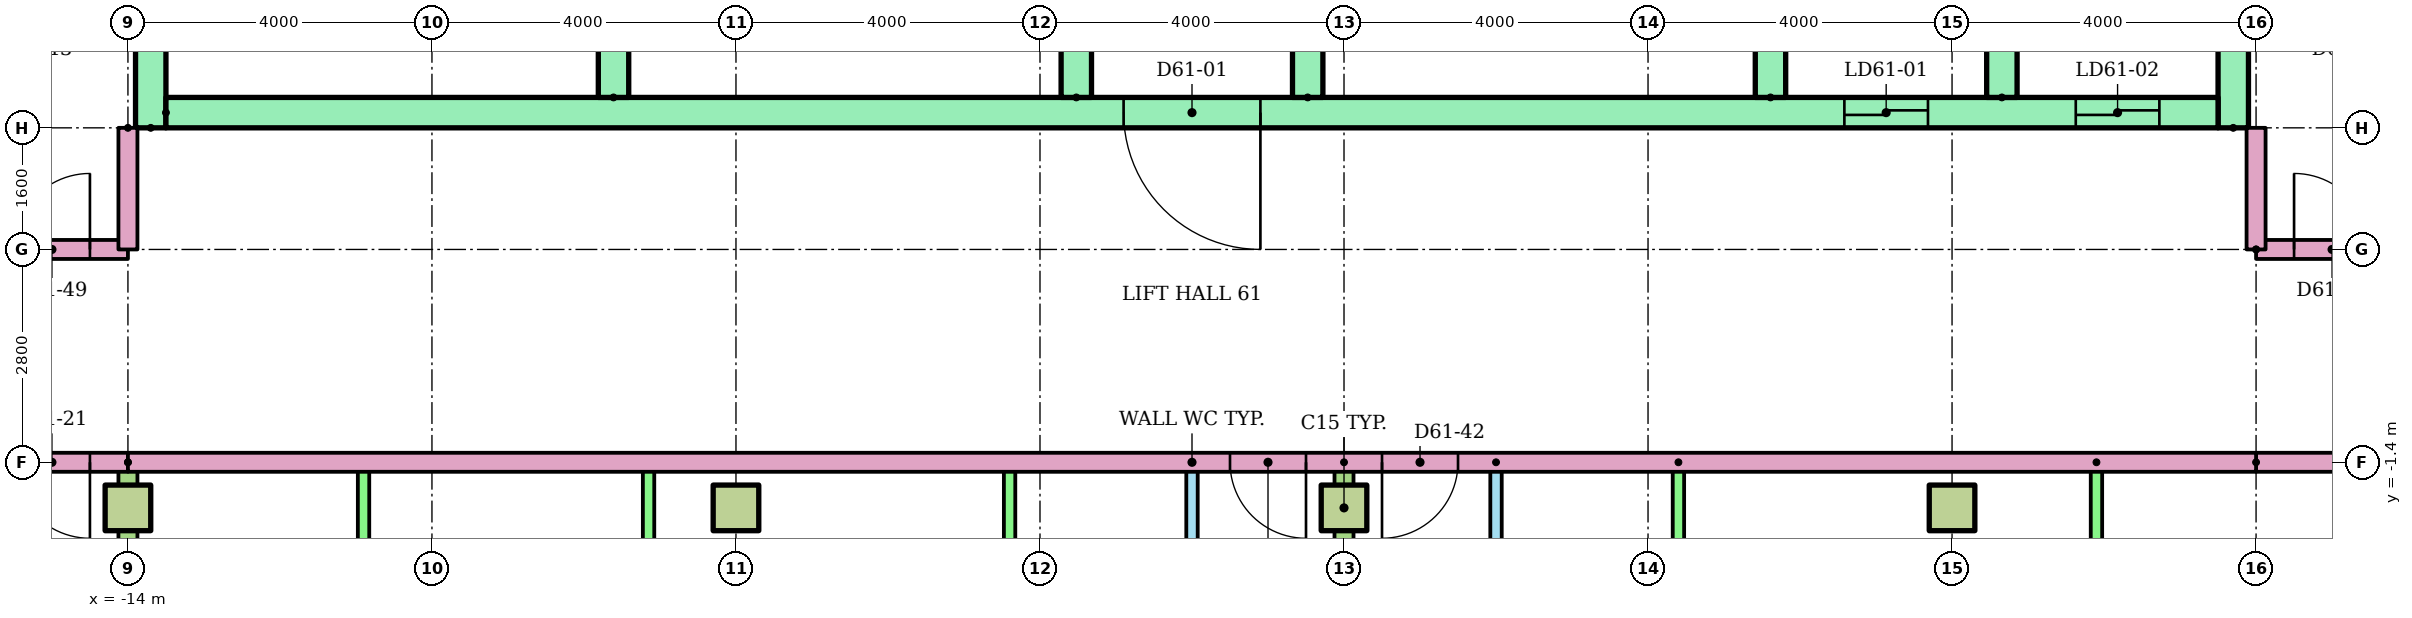
"""IFC4 building model, lengths in metres.
Left out: names, types, materials, properties, quantities, classifications, styles, units other than length and angle.
Written with IfcOpenShell. Run it as: python <this file> out.ifc"""

import sys

from ifc_helpers import new_model, si_unit, direction, frame, frame_2d, origin, origin_2d, place, context, subcontext, project, spatial, rectangle, extrude, element, fill, save


model = new_model("IFC4")
c1 = context("Model", 3, precision=1e-05, world=origin(), true_north=direction((0.0, 1.0)))
c2 = subcontext(c1, "Body", "Model", "MODEL_VIEW")
j1 = project(units=[si_unit("LENGTHUNIT", "METRE"), si_unit("PLANEANGLEUNIT", "RADIAN")], contexts=[c1])
p1 = place(None, origin())
s1 = spatial("IfcSite", under=j1, at=p1, CompositionType="ELEMENT")
p2 = place(p1, origin())
s2 = spatial("IfcBuilding", under=s1, at=p2, CompositionType="ELEMENT")
p3 = place(p2, frame((0.0, 0.0, 233.2)))
s3 = spatial("IfcBuildingStorey", under=s2, at=p3, CompositionType="ELEMENT", Elevation=233.2)
for number, where in (
    (1, (-14.0, -2.0, 0.0)),
    (2, (-6.0, -2.0, 0.0)),
    (3, (2.0, -2.0, 0.0)),
    (4, (10.0, -2.0, 0.0)),
):
    element("IfcColumn", number, at=place(p3, frame(where)), inside=s3, PredefinedType="COLUMN", context=c2, shape_type="SweptSolid", body=[
        extrude(rectangle(XDim=0.6, YDim=0.6, at=origin_2d()), origin(), (0.0, 0.0, 1.0), 3.2),
    ])
for number, where, z_axis, x_axis in (
    (5, (-13.7, 3.0, 0.0), (0.0, 0.0, 1.0), (0.0, 1.0, 0.0)),
    (6, (13.7, 3.0, 0.0), (0.0, 0.0, 1.0), (0.0, 1.0, 0.0)),
):
    element("IfcWall", number, at=place(p3, frame(where, z_axis=z_axis, x_axis=x_axis)), inside=s3, PredefinedType="SHEAR", context=c2, shape_type="SweptSolid", body=[
        extrude(rectangle(XDim=17.0, YDim=0.4, at=frame_2d((8.5, 0.0))), origin(), (0.0, 0.0, 1.0), 2.92),
    ])
p4 = place(p3, frame((-13.5, 3.2, 0.0)))
e7 = element("IfcWall", 7, at=p4, inside=s3, PredefinedType="SHEAR", context=c2, shape_type="SweptSolid", body=[
    extrude(rectangle(XDim=27.0, YDim=0.4, at=frame_2d((13.5, 0.0))), origin(), (0.0, 0.0, 1.0), 2.92),
])
p5 = place(p4, frame((22.083, 0.0, 0.0)))
e8 = element("IfcOpeningElement", 8, at=p5, cuts=e7, PredefinedType="OPENING", context=c2, shape_type="SweptSolid", body=[
    extrude(rectangle(XDim=1.1, YDim=2.1, at=frame_2d((0.55, 1.05))), frame((0.0, 0.21, 0.0), z_axis=(0.0, -1.0, 0.0), x_axis=(1.0, 0.0, 0.0)), (0.0, 0.0, 1.0), 0.42),
])
p6 = place(p4, frame((25.128, 0.0, 0.0)))
e9 = element("IfcOpeningElement", 9, at=p6, cuts=e7, PredefinedType="OPENING", context=c2, shape_type="SweptSolid", body=[
    extrude(rectangle(XDim=1.1, YDim=2.1, at=frame_2d((0.55, 1.05))), frame((0.0, 0.21, 0.0), z_axis=(0.0, -1.0, 0.0), x_axis=(1.0, 0.0, 0.0)), (0.0, 0.0, 1.0), 0.42),
])
p7 = place(p4, frame((12.6, 0.0, 0.0)))
e10 = element("IfcOpeningElement", 10, at=p7, cuts=e7, PredefinedType="OPENING", context=c2, shape_type="SweptSolid", body=[
    extrude(rectangle(XDim=1.8, YDim=2.1, at=frame_2d((0.9, 1.05))), frame((0.0, 0.21, 0.0), z_axis=(0.0, -1.0, 0.0), x_axis=(1.0, 0.0, 0.0)), (0.0, 0.0, 1.0), 0.42),
])
for number, where, z_axis, x_axis in (
    (11, (-7.611, 3.4, 0.0), (0.0, 0.0, 1.0), (0.0, 1.0, 0.0)),
    (12, (-1.522, 3.4, 0.0), (0.0, 0.0, 1.0), (0.0, 1.0, 0.0)),
    (13, (1.522, 3.4, 0.0), (0.0, 0.0, 1.0), (0.0, 1.0, 0.0)),
    (14, (7.611, 3.4, 0.0), (0.0, 0.0, 1.0), (0.0, 1.0, 0.0)),
    (15, (10.656, 3.4, 0.0), (0.0, 0.0, 1.0), (0.0, 1.0, 0.0)),
):
    element("IfcWall", number, at=place(p3, frame(where, z_axis=z_axis, x_axis=x_axis)), inside=s3, PredefinedType="SHEAR", context=c2, shape_type="SweptSolid", body=[
        extrude(rectangle(XDim=3.0, YDim=0.4, at=frame_2d((1.5, 0.0))), origin(), (0.0, 0.0, 1.0), 2.92),
    ])
p8 = place(p3, frame((0.0, -8.6, 0.0), z_axis=(0.0, 0.0, 1.0), x_axis=(0.0, 1.0, 0.0)))
e16 = element("IfcWall", 16, at=p8, inside=s3, PredefinedType="PARTITIONING", context=c2, shape_type="SweptSolid", body=[
    extrude(rectangle(XDim=7.2, YDim=0.15, at=frame_2d((3.6, 0.0))), origin(), (0.0, 0.0, 1.0), 2.4),
])
p9 = place(p8, frame((4.75, 0.0, 0.0)))
e17 = element("IfcOpeningElement", 17, at=p9, cuts=e16, PredefinedType="OPENING", context=c2, shape_type="SweptSolid", body=[
    extrude(rectangle(XDim=0.9, YDim=2.1, at=frame_2d((0.45, 1.05))), frame((0.0, 0.085, 0.0), z_axis=(0.0, -1.0, 0.0), x_axis=(1.0, 0.0, 0.0)), (0.0, 0.0, 1.0), 0.17),
])
p10 = place(p8, frame((1.2, 0.0, 0.0)))
e18 = element("IfcOpeningElement", 18, at=p10, cuts=e16, PredefinedType="OPENING", context=c2, shape_type="SweptSolid", body=[
    extrude(rectangle(XDim=0.8, YDim=2.1, at=frame_2d((0.4, 1.05))), frame((0.0, 0.085, 0.0), z_axis=(0.0, -1.0, 0.0), x_axis=(1.0, 0.0, 0.0)), (0.0, 0.0, 1.0), 0.17),
])
for number, where, z_axis, x_axis in (
    (19, (-2.4, -8.6, 0.0), (0.0, 0.0, 1.0), (0.0, 1.0, 0.0)),
    (20, (-7.15, -8.6, 0.0), (0.0, 0.0, 1.0), (0.0, 1.0, 0.0)),
    (21, (-10.9, -8.6, 0.0), (0.0, 0.0, 1.0), (0.0, 1.0, 0.0)),
):
    element("IfcWall", number, at=place(p3, frame(where, z_axis=z_axis, x_axis=x_axis)), inside=s3, PredefinedType="PARTITIONING", context=c2, shape_type="SweptSolid", body=[
        extrude(rectangle(XDim=7.2, YDim=0.15, at=frame_2d((3.6, 0.0))), origin(), (0.0, 0.0, 1.0), 2.4),
    ])
p11 = place(p3, frame((-14.0, -1.4, 0.0), z_axis=(0.0, 0.0, 1.0), x_axis=(0.0, -1.0, 0.0)))
e22 = element("IfcWall", 22, at=p11, inside=s3, PredefinedType="PARTITIONING", context=c2, shape_type="SweptSolid", body=[
    extrude(rectangle(XDim=15.11, YDim=0.25, at=frame_2d((7.555, 0.0))), origin(), (0.0, 0.0, 1.0), 2.4),
])
p12 = place(p3, frame((4.0, -1.4, 0.0), z_axis=(0.0, 0.0, 1.0), x_axis=(0.0, -1.0, 0.0)))
e23 = element("IfcWall", 23, at=p12, inside=s3, PredefinedType="PARTITIONING", context=c2, shape_type="SweptSolid", body=[
    extrude(rectangle(XDim=7.2, YDim=0.15, at=frame_2d((3.6, 0.0))), origin(), (0.0, 0.0, 1.0), 2.4),
])
p13 = place(p12, frame((1.55, 0.0, 0.0)))
e24 = element("IfcOpeningElement", 24, at=p13, cuts=e23, PredefinedType="OPENING", context=c2, shape_type="SweptSolid", body=[
    extrude(rectangle(XDim=0.9, YDim=2.1, at=frame_2d((0.45, 1.05))), frame((0.0, 0.085, 0.0), z_axis=(0.0, -1.0, 0.0), x_axis=(1.0, 0.0, 0.0)), (0.0, 0.0, 1.0), 0.17),
])
p14 = place(p12, frame((5.2, 0.0, 0.0)))
e25 = element("IfcOpeningElement", 25, at=p14, cuts=e23, PredefinedType="OPENING", context=c2, shape_type="SweptSolid", body=[
    extrude(rectangle(XDim=0.8, YDim=2.1, at=frame_2d((0.4, 1.05))), frame((0.0, 0.085, 0.0), z_axis=(0.0, -1.0, 0.0), x_axis=(1.0, 0.0, 0.0)), (0.0, 0.0, 1.0), 0.17),
])
for number, where, z_axis, x_axis in (
    (26, (6.4, -1.4, 0.0), (0.0, 0.0, 1.0), (0.0, -1.0, 0.0)),
    (27, (11.9, -1.4, 0.0), (0.0, 0.0, 1.0), (0.0, -1.0, 0.0)),
):
    element("IfcWall", number, at=place(p3, frame(where, z_axis=z_axis, x_axis=x_axis)), inside=s3, PredefinedType="PARTITIONING", context=c2, shape_type="SweptSolid", body=[
        extrude(rectangle(XDim=7.2, YDim=0.15, at=frame_2d((3.6, 0.0))), origin(), (0.0, 0.0, 1.0), 2.4),
    ])
p15 = place(p3, frame((2.0, -1.4, 0.0), z_axis=(0.0, 0.0, 1.0), x_axis=(0.0, -1.0, 0.0)))
e28 = element("IfcWall", 28, at=p15, inside=s3, PredefinedType="PARTITIONING", context=c2, shape_type="SweptSolid", body=[
    extrude(rectangle(XDim=15.11, YDim=0.25, at=frame_2d((7.555, 0.0))), origin(), (0.0, 0.0, 1.0), 2.4),
])
p16 = place(p3, frame((-14.0, -1.4, 0.0), z_axis=(0.0, 0.0, 1.0), x_axis=(-1.0, 0.0, 0.0)))
e29 = element("IfcWall", 29, at=p16, inside=s3, PredefinedType="PARTITIONING", context=c2, shape_type="SweptSolid", body=[
    extrude(rectangle(XDim=14.92, YDim=0.25, at=frame_2d((7.46, 0.0))), origin(), (0.0, 0.0, 1.0), 2.4),
])
p17 = place(p16, frame((0.5, 0.0, 0.0)))
e30 = element("IfcOpeningElement", 30, at=p17, cuts=e29, PredefinedType="OPENING", context=c2, shape_type="SweptSolid", body=[
    extrude(rectangle(XDim=1.0, YDim=2.1, at=frame_2d((0.5, 1.05))), frame((0.0, 0.135, 0.0), z_axis=(0.0, -1.0, 0.0), x_axis=(1.0, 0.0, 0.0)), (0.0, 0.0, 1.0), 0.27),
])
p18 = place(p3, frame((28.92, -1.4, 0.0), z_axis=(0.0, 0.0, 1.0), x_axis=(-1.0, 0.0, 0.0)))
e31 = element("IfcWall", 31, at=p18, inside=s3, PredefinedType="PARTITIONING", context=c2, shape_type="SweptSolid", body=[
    extrude(rectangle(XDim=14.92, YDim=0.25, at=frame_2d((7.46, 0.0))), origin(), (0.0, 0.0, 1.0), 2.4),
])
p19 = place(p3, frame((-28.92, 1.4, 0.0)))
e32 = element("IfcWall", 32, at=p19, inside=s3, PredefinedType="PARTITIONING", context=c2, shape_type="SweptSolid", body=[
    extrude(rectangle(XDim=14.92, YDim=0.25, at=frame_2d((7.46, 0.0))), origin(), (0.0, 0.0, 1.0), 2.4),
])
p20 = place(p19, frame((13.42, 0.0, 0.0)))
e33 = element("IfcOpeningElement", 33, at=p20, cuts=e32, PredefinedType="OPENING", context=c2, shape_type="SweptSolid", body=[
    extrude(rectangle(XDim=1.0, YDim=2.1, at=frame_2d((0.5, 1.05))), frame((0.0, 0.135, 0.0), z_axis=(0.0, -1.0, 0.0), x_axis=(1.0, 0.0, 0.0)), (0.0, 0.0, 1.0), 0.27),
])
p21 = place(p3, frame((14.0, 1.4, 0.0)))
e34 = element("IfcWall", 34, at=p21, inside=s3, PredefinedType="PARTITIONING", context=c2, shape_type="SweptSolid", body=[
    extrude(rectangle(XDim=14.92, YDim=0.25, at=frame_2d((7.46, 0.0))), origin(), (0.0, 0.0, 1.0), 2.4),
])
p22 = place(p21, frame((0.5, 0.0, 0.0)))
e35 = element("IfcOpeningElement", 35, at=p22, cuts=e34, PredefinedType="OPENING", context=c2, shape_type="SweptSolid", body=[
    extrude(rectangle(XDim=1.0, YDim=2.1, at=frame_2d((0.5, 1.05))), frame((0.0, 0.135, 0.0), z_axis=(0.0, -1.0, 0.0), x_axis=(1.0, 0.0, 0.0)), (0.0, 0.0, 1.0), 0.27),
])
p23 = place(p3, frame((14.0, -1.4, 0.0), z_axis=(0.0, 0.0, 1.0), x_axis=(-1.0, 0.0, 0.0)))
e36 = element("IfcWall", 36, at=p23, inside=s3, PredefinedType="PARTITIONING", context=c2, shape_type="SweptSolid", body=[
    extrude(rectangle(XDim=28.0, YDim=0.25, at=frame_2d((14.0, 0.0))), origin(), (0.0, 0.0, 1.0), 2.4),
])
p24 = place(p23, frame((12.5, 0.0, 0.0)))
e37 = element("IfcOpeningElement", 37, at=p24, cuts=e36, PredefinedType="OPENING", context=c2, shape_type="SweptSolid", body=[
    extrude(rectangle(XDim=1.0, YDim=2.1, at=frame_2d((0.5, 1.05))), frame((0.0, 0.135, 0.0), z_axis=(0.0, -1.0, 0.0), x_axis=(1.0, 0.0, 0.0)), (0.0, 0.0, 1.0), 0.27),
])
p25 = place(p23, frame((10.5, 0.0, 0.0)))
e38 = element("IfcOpeningElement", 38, at=p25, cuts=e36, PredefinedType="OPENING", context=c2, shape_type="SweptSolid", body=[
    extrude(rectangle(XDim=1.0, YDim=2.1, at=frame_2d((0.5, 1.05))), frame((0.0, 0.135, 0.0), z_axis=(0.0, -1.0, 0.0), x_axis=(1.0, 0.0, 0.0)), (0.0, 0.0, 1.0), 0.27),
])
for number, where, z_axis, x_axis in (
    (39, (-14.0, 3.0, 0.0), (0.0, 0.0, 1.0), (0.0, -1.0, 0.0)),
    (40, (14.0, 1.4, 0.0), (0.0, 0.0, 1.0), (0.0, 1.0, 0.0)),
):
    element("IfcWall", number, at=place(p3, frame(where, z_axis=z_axis, x_axis=x_axis)), inside=s3, PredefinedType="PARTITIONING", context=c2, shape_type="SweptSolid", body=[
        extrude(rectangle(XDim=1.6, YDim=0.25, at=frame_2d((0.8, 0.0))), origin(), (0.0, 0.0, 1.0), 2.4),
    ])
p26 = place(p5, origin())
e41 = element("IfcDoor", 41, at=p26, inside=s3, OperationType="SLIDING_TO_LEFT", PredefinedType="DOOR", context=c2, shape_type="SweptSolid", body=[
    extrude(rectangle(XDim=1.1, YDim=2.1, at=frame_2d((0.55, 1.05))), frame((0.0, 0.025, 0.0), z_axis=(0.0, -1.0, 0.0), x_axis=(1.0, 0.0, 0.0)), (0.0, 0.0, 1.0), 0.05),
])
fill(e8, e41)
p27 = place(p6, origin())
e42 = element("IfcDoor", 42, at=p27, inside=s3, OperationType="SLIDING_TO_LEFT", PredefinedType="DOOR", context=c2, shape_type="SweptSolid", body=[
    extrude(rectangle(XDim=1.1, YDim=2.1, at=frame_2d((0.55, 1.05))), frame((0.0, 0.025, 0.0), z_axis=(0.0, -1.0, 0.0), x_axis=(1.0, 0.0, 0.0)), (0.0, 0.0, 1.0), 0.05),
])
fill(e9, e42)
p28 = place(p7, frame((1.8, 0.0, 0.0), z_axis=(0.0, 0.0, 1.0), x_axis=(-1.0, 0.0, 0.0)))
e43 = element("IfcDoor", 43, at=p28, inside=s3, OperationType="DOUBLE_DOOR_SINGLE_SWING", PredefinedType="DOOR", context=c2, shape_type="SweptSolid", body=[
    extrude(rectangle(XDim=1.8, YDim=2.1, at=frame_2d((0.9, 1.05))), frame((0.0, 0.025, 0.0), z_axis=(0.0, -1.0, 0.0), x_axis=(1.0, 0.0, 0.0)), (0.0, 0.0, 1.0), 0.05),
])
fill(e10, e43)
p29 = place(p17, origin())
e44 = element("IfcDoor", 44, at=p29, inside=s3, OperationType="SINGLE_SWING_LEFT", PredefinedType="DOOR", context=c2, shape_type="SweptSolid", body=[
    extrude(rectangle(XDim=1.0, YDim=2.1, at=frame_2d((0.5, 1.05))), frame((0.0, 0.025, 0.0), z_axis=(0.0, -1.0, 0.0), x_axis=(1.0, 0.0, 0.0)), (0.0, 0.0, 1.0), 0.05),
])
fill(e30, e44)
p30 = place(p24, origin())
e45 = element("IfcDoor", 45, at=p30, inside=s3, OperationType="SINGLE_SWING_LEFT", PredefinedType="DOOR", context=c2, shape_type="SweptSolid", body=[
    extrude(rectangle(XDim=1.0, YDim=2.1, at=frame_2d((0.5, 1.05))), frame((0.0, 0.025, 0.0), z_axis=(0.0, -1.0, 0.0), x_axis=(1.0, 0.0, 0.0)), (0.0, 0.0, 1.0), 0.05),
])
fill(e37, e45)
p31 = place(p25, origin())
e46 = element("IfcDoor", 46, at=p31, inside=s3, OperationType="SINGLE_SWING_RIGHT", PredefinedType="DOOR", context=c2, shape_type="SweptSolid", body=[
    extrude(rectangle(XDim=1.0, YDim=2.1, at=frame_2d((0.5, 1.05))), frame((0.0, 0.025, 0.0), z_axis=(0.0, -1.0, 0.0), x_axis=(1.0, 0.0, 0.0)), (0.0, 0.0, 1.0), 0.05),
])
fill(e38, e46)
p32 = place(p20, origin())
e47 = element("IfcDoor", 47, at=p32, inside=s3, OperationType="SINGLE_SWING_RIGHT", PredefinedType="DOOR", context=c2, shape_type="SweptSolid", body=[
    extrude(rectangle(XDim=1.0, YDim=2.1, at=frame_2d((0.5, 1.05))), frame((0.0, 0.025, 0.0), z_axis=(0.0, -1.0, 0.0), x_axis=(1.0, 0.0, 0.0)), (0.0, 0.0, 1.0), 0.05),
])
fill(e33, e47)
p33 = place(p22, origin())
e48 = element("IfcDoor", 48, at=p33, inside=s3, OperationType="SINGLE_SWING_LEFT", PredefinedType="DOOR", context=c2, shape_type="SweptSolid", body=[
    extrude(rectangle(XDim=1.0, YDim=2.1, at=frame_2d((0.5, 1.05))), frame((0.0, 0.025, 0.0), z_axis=(0.0, -1.0, 0.0), x_axis=(1.0, 0.0, 0.0)), (0.0, 0.0, 1.0), 0.05),
])
fill(e35, e48)
save(model, sys.argv[1])
